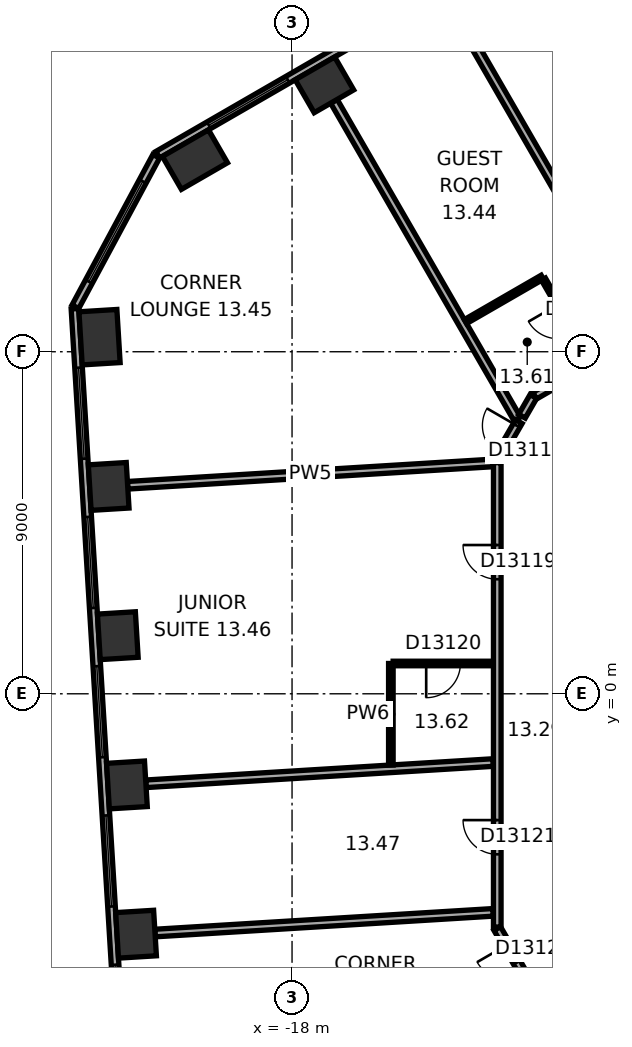
"""IFC4 building model, lengths in metres.
Left out: names, types, materials, properties, quantities, classifications, styles, units other than length and angle.
Written with IfcOpenShell. Run it as: python <this file> out.ifc"""

import sys

from ifc_helpers import new_model, si_unit, direction, frame, frame_2d, origin, origin_2d, place, context, subcontext, project, spatial, rectangle, extrude, element, fill, save


model = new_model("IFC4")
c1 = context("Model", 3, precision=1e-05, world=origin(), true_north=direction((0.0, 1.0)))
c2 = subcontext(c1, "Body", "Model", "MODEL_VIEW")
j1 = project(units=[si_unit("LENGTHUNIT", "METRE"), si_unit("PLANEANGLEUNIT", "RADIAN")], contexts=[c1])
p1 = place(None, origin())
s1 = spatial("IfcSite", under=j1, at=p1, CompositionType="ELEMENT")
p2 = place(p1, origin())
s2 = spatial("IfcBuilding", under=s1, at=p2, CompositionType="ELEMENT")
p3 = place(p2, frame((0.0, 0.0, 63.8)))
s3 = spatial("IfcBuildingStorey", under=s2, at=p3, CompositionType="ELEMENT", Elevation=63.8)
p4 = place(p3, frame((-17.148, 16.023, 0.0), z_axis=(0.0, 0.0, 1.0), x_axis=(-0.866025403784, -0.5, 0.0)))
e1 = element("IfcColumn", 1, at=p4, inside=s3, PredefinedType="COLUMN", context=c2, shape_type="SweptSolid", body=[
    extrude(rectangle(XDim=1.2, YDim=1.0, at=origin_2d()), origin(), (0.0, 0.0, 1.0), 3.3),
])
for number, where, z_axis, x_axis in (
    (2, (-20.555, 14.055, 0.0), (0.0, 0.0, 1.0), (-0.866, -0.5, 0.0)),
    (3, (-23.066, 9.383, 0.0), (0.0, 0.0, 1.0), (0.061, -0.998, 0.0)),
):
    element("IfcColumn", number, at=place(p3, frame(where, z_axis=z_axis, x_axis=x_axis)), inside=s3, PredefinedType="COLUMN", context=c2, shape_type="SweptSolid", body=[
        extrude(rectangle(XDim=1.4, YDim=1.0, at=origin_2d()), origin(), (0.0, 0.0, 1.0), 3.3),
    ])
for number, where, z_axis, x_axis in (
    (4, (-22.826, 5.456, 0.0), (0.0, 0.0, 1.0), (0.061, -0.998, 0.0)),
    (5, (-22.585, 1.529, 0.0), (0.0, 0.0, 1.0), (0.061, -0.998, 0.0)),
    (6, (-22.345, -2.399, 0.0), (0.0, 0.0, 1.0), (0.061, -0.998, 0.0)),
    (7, (-22.105, -6.326, 0.0), (0.0, 0.0, 1.0), (0.061, -0.998, 0.0)),
):
    element("IfcColumn", number, at=place(p3, frame(where, z_axis=z_axis, x_axis=x_axis)), inside=s3, PredefinedType="COLUMN", context=c2, shape_type="SweptSolid", body=[
        extrude(rectangle(XDim=1.2, YDim=1.0, at=origin_2d()), origin(), (0.0, 0.0, 1.0), 3.3),
    ])
p5 = place(p3, frame((-3.136, 24.805, 0.0), z_axis=(0.0, 0.0, 1.0), x_axis=(-0.866028291626, -0.499994998079, 0.0)))
e8 = element("IfcWall", 8, at=p5, inside=s3, PredefinedType="STANDARD", context=c2, shape_type="SweptSolid", body=[
    extrude(rectangle(XDim=21.246, YDim=0.2, at=frame_2d((10.623, 0.0))), origin(), (0.0, 0.0, 1.0), 3.3),
])
p6 = place(p5, frame((1.555, 0.0, 0.8)))
e9 = element("IfcOpeningElement", 9, at=p6, cuts=e8, PredefinedType="OPENING", context=c2, shape_type="SweptSolid", body=[
    extrude(rectangle(XDim=2.4, YDim=1.7, at=frame_2d((1.2, 0.85))), frame((0.0, 0.11, 0.0), z_axis=(0.0, -1.0, 0.0), x_axis=(1.0, 0.0, 0.0)), (0.0, 0.0, 1.0), 0.22),
])
p7 = place(p5, frame((5.489, 0.0, 0.8)))
e10 = element("IfcOpeningElement", 10, at=p7, cuts=e8, PredefinedType="OPENING", context=c2, shape_type="SweptSolid", body=[
    extrude(rectangle(XDim=2.4, YDim=1.7, at=frame_2d((1.2, 0.85))), frame((0.0, 0.11, 0.0), z_axis=(0.0, -1.0, 0.0), x_axis=(1.0, 0.0, 0.0)), (0.0, 0.0, 1.0), 0.22),
])
p8 = place(p5, frame((9.424, 0.0, 0.8)))
e11 = element("IfcOpeningElement", 11, at=p8, cuts=e8, PredefinedType="OPENING", context=c2, shape_type="SweptSolid", body=[
    extrude(rectangle(XDim=2.4, YDim=1.7, at=frame_2d((1.2, 0.85))), frame((0.0, 0.11, 0.0), z_axis=(0.0, -1.0, 0.0), x_axis=(1.0, 0.0, 0.0)), (0.0, 0.0, 1.0), 0.22),
])
p9 = place(p5, frame((13.358, 0.0, 0.8)))
e12 = element("IfcOpeningElement", 12, at=p9, cuts=e8, PredefinedType="OPENING", context=c2, shape_type="SweptSolid", body=[
    extrude(rectangle(XDim=2.4, YDim=1.7, at=frame_2d((1.2, 0.85))), frame((0.0, 0.11, 0.0), z_axis=(0.0, -1.0, 0.0), x_axis=(1.0, 0.0, 0.0)), (0.0, 0.0, 1.0), 0.22),
])
p10 = place(p5, frame((17.293, 0.0, 0.8)))
e13 = element("IfcOpeningElement", 13, at=p10, cuts=e8, PredefinedType="OPENING", context=c2, shape_type="SweptSolid", body=[
    extrude(rectangle(XDim=2.4, YDim=1.7, at=frame_2d((1.2, 0.85))), frame((0.0, 0.11, 0.0), z_axis=(0.0, -1.0, 0.0), x_axis=(1.0, 0.0, 0.0)), (0.0, 0.0, 1.0), 0.22),
])
p11 = place(p3, frame((-21.574, 14.143, 0.0), z_axis=(0.0, 0.0, 1.0), x_axis=(-0.473292949472, -0.880905093628, 0.0)))
e14 = element("IfcWall", 14, at=p11, inside=s3, PredefinedType="STANDARD", context=c2, shape_type="SweptSolid", body=[
    extrude(rectangle(XDim=4.494, YDim=0.2, at=frame_2d((2.247, 0.0))), origin(), (0.0, 0.0, 1.0), 3.3),
])
p12 = place(p11, frame((0.747, 0.0, 0.8)))
e15 = element("IfcOpeningElement", 15, at=p12, cuts=e14, PredefinedType="OPENING", context=c2, shape_type="SweptSolid", body=[
    extrude(rectangle(XDim=3.0, YDim=1.7, at=frame_2d((1.5, 0.85))), frame((0.0, 0.11, 0.0), z_axis=(0.0, -1.0, 0.0), x_axis=(1.0, 0.0, 0.0)), (0.0, 0.0, 1.0), 0.22),
])
p13 = place(p3, frame((-23.713, 10.131, 0.0), z_axis=(0.0, 0.0, 1.0), x_axis=(0.061040439785, -0.998135293791, 0.0)))
e16 = element("IfcWall", 16, at=p13, inside=s3, PredefinedType="STANDARD", context=c2, shape_type="SweptSolid", body=[
    extrude(rectangle(XDim=21.246, YDim=0.2, at=frame_2d((10.623, 0.0))), origin(), (0.0, 0.0, 1.0), 3.3),
])
p14 = place(p13, frame((1.553, 0.0, 0.8)))
e17 = element("IfcOpeningElement", 17, at=p14, cuts=e16, PredefinedType="OPENING", context=c2, shape_type="SweptSolid", body=[
    extrude(rectangle(XDim=2.4, YDim=1.7, at=frame_2d((1.2, 0.85))), frame((0.0, 0.11, 0.0), z_axis=(0.0, -1.0, 0.0), x_axis=(1.0, 0.0, 0.0)), (0.0, 0.0, 1.0), 0.22),
])
p15 = place(p13, frame((5.488, 0.0, 0.8)))
e18 = element("IfcOpeningElement", 18, at=p15, cuts=e16, PredefinedType="OPENING", context=c2, shape_type="SweptSolid", body=[
    extrude(rectangle(XDim=2.4, YDim=1.7, at=frame_2d((1.2, 0.85))), frame((0.0, 0.11, 0.0), z_axis=(0.0, -1.0, 0.0), x_axis=(1.0, 0.0, 0.0)), (0.0, 0.0, 1.0), 0.22),
])
p16 = place(p13, frame((9.422, 0.0, 0.8)))
e19 = element("IfcOpeningElement", 19, at=p16, cuts=e16, PredefinedType="OPENING", context=c2, shape_type="SweptSolid", body=[
    extrude(rectangle(XDim=2.4, YDim=1.7, at=frame_2d((1.2, 0.85))), frame((0.0, 0.11, 0.0), z_axis=(0.0, -1.0, 0.0), x_axis=(1.0, 0.0, 0.0)), (0.0, 0.0, 1.0), 0.22),
])
p17 = place(p13, frame((13.357, 0.0, 0.8)))
e20 = element("IfcOpeningElement", 20, at=p17, cuts=e16, PredefinedType="OPENING", context=c2, shape_type="SweptSolid", body=[
    extrude(rectangle(XDim=2.4, YDim=1.7, at=frame_2d((1.2, 0.85))), frame((0.0, 0.11, 0.0), z_axis=(0.0, -1.0, 0.0), x_axis=(1.0, 0.0, 0.0)), (0.0, 0.0, 1.0), 0.22),
])
p18 = place(p13, frame((17.292, 0.0, 0.8)))
e21 = element("IfcOpeningElement", 21, at=p18, cuts=e16, PredefinedType="OPENING", context=c2, shape_type="SweptSolid", body=[
    extrude(rectangle(XDim=2.4, YDim=1.7, at=frame_2d((1.2, 0.85))), frame((0.0, 0.11, 0.0), z_axis=(0.0, -1.0, 0.0), x_axis=(1.0, 0.0, 0.0)), (0.0, 0.0, 1.0), 0.22),
])
p19 = place(p3, frame((-22.327, 5.486, 0.0), z_axis=(0.0, 0.0, 1.0), x_axis=(0.998135194863, 0.061042057435, 0.0)))
e22 = element("IfcWall", 22, at=p19, inside=s3, PredefinedType="PARTITIONING", context=c2, shape_type="SweptSolid", body=[
    extrude(rectangle(XDim=9.635, YDim=0.2, at=frame_2d((4.817, 0.0))), origin(), (0.0, 0.0, 1.0), 3.05),
])
p20 = place(p3, frame((-21.846, -2.368, 0.0), z_axis=(0.0, 0.0, 1.0), x_axis=(0.998134617584, 0.061051496129, 0.0)))
e23 = element("IfcWall", 23, at=p20, inside=s3, PredefinedType="PARTITIONING", context=c2, shape_type="SweptSolid", body=[
    extrude(rectangle(XDim=9.154, YDim=0.2, at=frame_2d((4.577, 0.0))), origin(), (0.0, 0.0, 1.0), 3.05),
])
p21 = place(p3, frame((-21.606, -6.295, 0.0), z_axis=(0.0, 0.0, 1.0), x_axis=(0.998134305525, 0.061056597794, 0.0)))
e24 = element("IfcWall", 24, at=p21, inside=s3, PredefinedType="PARTITIONING", context=c2, shape_type="SweptSolid", body=[
    extrude(rectangle(XDim=8.913, YDim=0.2, at=frame_2d((4.457, 0.0))), origin(), (0.0, 0.0, 1.0), 2.6),
])
p22 = place(p3, frame((-16.898, 15.59, 0.0), z_axis=(0.0, 0.0, 1.0), x_axis=(0.499994742786, -0.866028439017, 0.0)))
e25 = element("IfcWall", 25, at=p22, inside=s3, PredefinedType="PARTITIONING", context=c2, shape_type="SweptSolid", body=[
    extrude(rectangle(XDim=9.65, YDim=0.2, at=frame_2d((4.825, 0.0))), origin(), (0.0, 0.0, 1.0), 3.05),
])
p23 = place(p3, frame((-15.4, -1.874, 0.0), z_axis=(0.0, 0.0, 1.0), x_axis=(0.0, 1.0, 0.0)))
e26 = element("IfcWall", 26, at=p23, inside=s3, PredefinedType="PARTITIONING", context=c2, shape_type="SweptSolid", body=[
    extrude(rectangle(XDim=2.671, YDim=0.12, at=frame_2d((1.335, 0.0))), origin(), (0.0, 0.0, 1.0), 3.05),
])
p24 = place(p3, frame((-15.34, 0.797, 0.0), z_axis=(0.0, 0.0, 1.0), x_axis=(1.0, 0.0, 0.0)))
e27 = element("IfcWall", 27, at=p24, inside=s3, PredefinedType="PARTITIONING", context=c2, shape_type="SweptSolid", body=[
    extrude(rectangle(XDim=2.64, YDim=0.12, at=frame_2d((1.32, 0.0))), origin(), (0.0, 0.0, 1.0), 2.6),
])
p25 = place(p24, frame((0.87, 0.0, 0.0)))
e28 = element("IfcOpeningElement", 28, at=p25, cuts=e27, PredefinedType="OPENING", context=c2, shape_type="SweptSolid", body=[
    extrude(rectangle(XDim=0.9, YDim=2.1, at=frame_2d((0.45, 1.05))), frame((0.0, 0.07, 0.0), z_axis=(0.0, -1.0, 0.0), x_axis=(1.0, 0.0, 0.0)), (0.0, 0.0, 1.0), 0.14),
])
p26 = place(p3, frame((-13.436, 9.794, 0.0), z_axis=(0.0, 0.0, 1.0), x_axis=(0.866053246676, 0.499951771596, 0.0)))
e29 = element("IfcWall", 29, at=p26, inside=s3, PredefinedType="PARTITIONING", context=c2, shape_type="SweptSolid", body=[
    extrude(rectangle(XDim=2.335, YDim=0.12, at=frame_2d((1.167, 0.0))), origin(), (0.0, 0.0, 1.0), 3.05),
])
p27 = place(p3, frame((-12.6, -6.177, 0.0), z_axis=(0.0, 0.0, 1.0), x_axis=(0.500063520245, -0.865988727248, 0.0)))
e30 = element("IfcWall", 30, at=p27, inside=s3, PredefinedType="PARTITIONING", context=c2, shape_type="SweptSolid", body=[
    extrude(rectangle(XDim=1.9, YDim=0.2, at=frame_2d((0.95, 0.0))), origin(), (0.0, 0.0, 1.0), 3.05),
])
p28 = place(p27, frame((0.5, 0.0, 0.0)))
e31 = element("IfcOpeningElement", 31, at=p28, cuts=e30, PredefinedType="OPENING", context=c2, shape_type="SweptSolid", body=[
    extrude(rectangle(XDim=0.9, YDim=2.1, at=frame_2d((0.45, 1.05))), frame((0.0, 0.11, 0.0), z_axis=(0.0, -1.0, 0.0), x_axis=(1.0, 0.0, 0.0)), (0.0, 0.0, 1.0), 0.22),
])
p29 = place(p3, frame((-12.6, 6.081, 0.0), z_axis=(0.0, 0.0, 1.0), x_axis=(0.0, -1.0, 0.0)))
e32 = element("IfcWall", 32, at=p29, inside=s3, PredefinedType="PARTITIONING", context=c2, shape_type="SweptSolid", body=[
    extrude(rectangle(XDim=12.219, YDim=0.2, at=frame_2d((6.109, 0.0))), origin(), (0.0, 0.0, 1.0), 3.05),
])
p30 = place(p29, frame((2.167, 0.0, 0.0)))
e33 = element("IfcOpeningElement", 33, at=p30, cuts=e32, PredefinedType="OPENING", context=c2, shape_type="SweptSolid", body=[
    extrude(rectangle(XDim=0.9, YDim=2.1, at=frame_2d((0.45, 1.05))), frame((0.0, 0.11, 0.0), z_axis=(0.0, -1.0, 0.0), x_axis=(1.0, 0.0, 0.0)), (0.0, 0.0, 1.0), 0.22),
])
p31 = place(p29, frame((9.405, 0.0, 0.0)))
e34 = element("IfcOpeningElement", 34, at=p31, cuts=e32, PredefinedType="OPENING", context=c2, shape_type="SweptSolid", body=[
    extrude(rectangle(XDim=0.9, YDim=2.1, at=frame_2d((0.45, 1.05))), frame((0.0, 0.11, 0.0), z_axis=(0.0, -1.0, 0.0), x_axis=(1.0, 0.0, 0.0)), (0.0, 0.0, 1.0), 0.22),
])
p32 = place(p3, frame((-12.032, 7.162, 0.0), z_axis=(0.0, 0.0, 1.0), x_axis=(-0.499951829968, -0.866053212979, 0.0)))
e35 = element("IfcWall", 35, at=p32, inside=s3, PredefinedType="PARTITIONING", context=c2, shape_type="SweptSolid", body=[
    extrude(rectangle(XDim=1.136, YDim=0.2, at=frame_2d((0.568, 0.0))), origin(), (0.0, 0.0, 1.0), 3.05),
])
p33 = place(p32, frame((0.118, 0.0, 0.0)))
e36 = element("IfcOpeningElement", 36, at=p33, cuts=e35, PredefinedType="OPENING", context=c2, shape_type="SweptSolid", body=[
    extrude(rectangle(XDim=0.9, YDim=2.1, at=frame_2d((0.45, 1.05))), frame((0.0, 0.11, 0.0), z_axis=(0.0, -1.0, 0.0), x_axis=(1.0, 0.0, 0.0)), (0.0, 0.0, 1.0), 0.22),
])
p34 = place(p3, frame((-11.65, 7.823, 0.0), z_axis=(0.0, 0.0, 1.0), x_axis=(-0.50012165622, -0.865955154139, 0.0)))
e37 = element("IfcWall", 37, at=p34, inside=s3, PredefinedType="PARTITIONING", context=c2, shape_type="SweptSolid", body=[
    extrude(rectangle(XDim=0.6, YDim=0.2, at=frame_2d((0.3, 0.0))), origin(), (0.0, 0.0, 1.0), 3.05),
])
p35 = place(p3, frame((-11.385, 10.909, 0.0), z_axis=(0.0, 0.0, 1.0), x_axis=(0.500077547548, -0.865980627057, 0.0)))
e38 = element("IfcWall", 38, at=p35, inside=s3, PredefinedType="PARTITIONING", context=c2, shape_type="SweptSolid", body=[
    extrude(rectangle(XDim=2.44, YDim=0.12, at=frame_2d((1.22, 0.0))), origin(), (0.0, 0.0, 1.0), 3.05),
])
p36 = place(p35, frame((0.77, 0.0, 0.0)))
e39 = element("IfcOpeningElement", 39, at=p36, cuts=e38, PredefinedType="OPENING", context=c2, shape_type="SweptSolid", body=[
    extrude(rectangle(XDim=0.9, YDim=2.1, at=frame_2d((0.45, 1.05))), frame((0.0, 0.07, 0.0), z_axis=(0.0, -1.0, 0.0), x_axis=(1.0, 0.0, 0.0)), (0.0, 0.0, 1.0), 0.14),
])
p37 = place(p3, frame((-8.902, 9.41, 0.0), z_axis=(0.0, 0.0, 1.0), x_axis=(-0.866014299198, -0.500019233215, 0.0)))
e40 = element("IfcWall", 40, at=p37, inside=s3, PredefinedType="PARTITIONING", context=c2, shape_type="SweptSolid", body=[
    extrude(rectangle(XDim=3.133, YDim=0.2, at=frame_2d((1.567, 0.0))), origin(), (0.0, 0.0, 1.0), 3.05),
])
p38 = place(p37, frame((0.225, 0.0, 0.0)))
e41 = element("IfcOpeningElement", 41, at=p38, cuts=e40, PredefinedType="OPENING", context=c2, shape_type="SweptSolid", body=[
    extrude(rectangle(XDim=0.9, YDim=2.1, at=frame_2d((0.45, 1.05))), frame((0.0, 0.11, 0.0), z_axis=(0.0, -1.0, 0.0), x_axis=(1.0, 0.0, 0.0)), (0.0, 0.0, 1.0), 0.22),
])
p39 = place(p3, frame((-7.865, 7.814, 0.0), z_axis=(0.0, 0.0, 1.0), x_axis=(-0.500004234368, 0.866022959057, 0.0)))
e42 = element("IfcWall", 42, at=p39, inside=s3, PredefinedType="PARTITIONING", context=c2, shape_type="SweptSolid", body=[
    extrude(rectangle(XDim=11.25, YDim=0.2, at=frame_2d((5.625, 0.0))), origin(), (0.0, 0.0, 1.0), 3.05),
])
p40 = place(p39, frame((0.5, 0.0, 0.0)))
e43 = element("IfcOpeningElement", 43, at=p40, cuts=e42, PredefinedType="OPENING", context=c2, shape_type="SweptSolid", body=[
    extrude(rectangle(XDim=0.9, YDim=2.1, at=frame_2d((0.45, 1.05))), frame((0.0, 0.11, 0.0), z_axis=(0.0, -1.0, 0.0), x_axis=(1.0, 0.0, 0.0)), (0.0, 0.0, 1.0), 0.22),
])
p41 = place(p10, origin())
e44 = element("IfcWindow", 44, at=p41, inside=s3, PartitioningType="SINGLE_PANEL", PredefinedType="WINDOW", context=c2, shape_type="SweptSolid", body=[
    extrude(rectangle(XDim=2.4, YDim=1.7, at=frame_2d((1.2, 0.85))), frame((0.0, 0.03, 0.0), z_axis=(0.0, -1.0, 0.0), x_axis=(1.0, 0.0, 0.0)), (0.0, 0.0, 1.0), 0.06),
])
fill(e13, e44)
p42 = place(p12, origin())
e45 = element("IfcWindow", 45, at=p42, inside=s3, PartitioningType="SINGLE_PANEL", PredefinedType="WINDOW", context=c2, shape_type="SweptSolid", body=[
    extrude(rectangle(XDim=3.0, YDim=1.7, at=frame_2d((1.5, 0.85))), frame((0.0, 0.03, 0.0), z_axis=(0.0, -1.0, 0.0), x_axis=(1.0, 0.0, 0.0)), (0.0, 0.0, 1.0), 0.06),
])
fill(e15, e45)
p43 = place(p14, origin())
e46 = element("IfcWindow", 46, at=p43, inside=s3, PartitioningType="SINGLE_PANEL", PredefinedType="WINDOW", context=c2, shape_type="SweptSolid", body=[
    extrude(rectangle(XDim=2.4, YDim=1.7, at=frame_2d((1.2, 0.85))), frame((0.0, 0.03, 0.0), z_axis=(0.0, -1.0, 0.0), x_axis=(1.0, 0.0, 0.0)), (0.0, 0.0, 1.0), 0.06),
])
fill(e17, e46)
p44 = place(p15, origin())
e47 = element("IfcWindow", 47, at=p44, inside=s3, PartitioningType="SINGLE_PANEL", PredefinedType="WINDOW", context=c2, shape_type="SweptSolid", body=[
    extrude(rectangle(XDim=2.4, YDim=1.7, at=frame_2d((1.2, 0.85))), frame((0.0, 0.03, 0.0), z_axis=(0.0, -1.0, 0.0), x_axis=(1.0, 0.0, 0.0)), (0.0, 0.0, 1.0), 0.06),
])
fill(e18, e47)
p45 = place(p16, origin())
e48 = element("IfcWindow", 48, at=p45, inside=s3, PartitioningType="SINGLE_PANEL", PredefinedType="WINDOW", context=c2, shape_type="SweptSolid", body=[
    extrude(rectangle(XDim=2.4, YDim=1.7, at=frame_2d((1.2, 0.85))), frame((0.0, 0.03, 0.0), z_axis=(0.0, -1.0, 0.0), x_axis=(1.0, 0.0, 0.0)), (0.0, 0.0, 1.0), 0.06),
])
fill(e19, e48)
p46 = place(p17, origin())
e49 = element("IfcWindow", 49, at=p46, inside=s3, PartitioningType="SINGLE_PANEL", PredefinedType="WINDOW", context=c2, shape_type="SweptSolid", body=[
    extrude(rectangle(XDim=2.4, YDim=1.7, at=frame_2d((1.2, 0.85))), frame((0.0, 0.03, 0.0), z_axis=(0.0, -1.0, 0.0), x_axis=(1.0, 0.0, 0.0)), (0.0, 0.0, 1.0), 0.06),
])
fill(e20, e49)
p47 = place(p18, origin())
e50 = element("IfcWindow", 50, at=p47, inside=s3, PartitioningType="SINGLE_PANEL", PredefinedType="WINDOW", context=c2, shape_type="SweptSolid", body=[
    extrude(rectangle(XDim=2.4, YDim=1.7, at=frame_2d((1.2, 0.85))), frame((0.0, 0.03, 0.0), z_axis=(0.0, -1.0, 0.0), x_axis=(1.0, 0.0, 0.0)), (0.0, 0.0, 1.0), 0.06),
])
fill(e21, e50)
p48 = place(p33, origin())
e51 = element("IfcDoor", 51, at=p48, inside=s3, OperationType="SINGLE_SWING_LEFT", PredefinedType="DOOR", context=c2, shape_type="SweptSolid", body=[
    extrude(rectangle(XDim=0.9, YDim=2.1, at=frame_2d((0.45, 1.05))), frame((0.0, 0.025, 0.0), z_axis=(0.0, -1.0, 0.0), x_axis=(1.0, 0.0, 0.0)), (0.0, 0.0, 1.0), 0.05),
])
fill(e36, e51)
p49 = place(p30, origin())
e52 = element("IfcDoor", 52, at=p49, inside=s3, OperationType="SINGLE_SWING_LEFT", PredefinedType="DOOR", context=c2, shape_type="SweptSolid", body=[
    extrude(rectangle(XDim=0.9, YDim=2.1, at=frame_2d((0.45, 1.05))), frame((0.0, 0.025, 0.0), z_axis=(0.0, -1.0, 0.0), x_axis=(1.0, 0.0, 0.0)), (0.0, 0.0, 1.0), 0.05),
])
fill(e33, e52)
p50 = place(p25, origin())
e53 = element("IfcDoor", 53, at=p50, inside=s3, OperationType="SINGLE_SWING_LEFT", PredefinedType="DOOR", context=c2, shape_type="SweptSolid", body=[
    extrude(rectangle(XDim=0.9, YDim=2.1, at=frame_2d((0.45, 1.05))), frame((0.0, 0.025, 0.0), z_axis=(0.0, -1.0, 0.0), x_axis=(1.0, 0.0, 0.0)), (0.0, 0.0, 1.0), 0.05),
])
fill(e28, e53)
p51 = place(p31, origin())
e54 = element("IfcDoor", 54, at=p51, inside=s3, OperationType="SINGLE_SWING_LEFT", PredefinedType="DOOR", context=c2, shape_type="SweptSolid", body=[
    extrude(rectangle(XDim=0.9, YDim=2.1, at=frame_2d((0.45, 1.05))), frame((0.0, 0.025, 0.0), z_axis=(0.0, -1.0, 0.0), x_axis=(1.0, 0.0, 0.0)), (0.0, 0.0, 1.0), 0.05),
])
fill(e34, e54)
p52 = place(p28, origin())
e55 = element("IfcDoor", 55, at=p52, inside=s3, OperationType="SINGLE_SWING_LEFT", PredefinedType="DOOR", context=c2, shape_type="SweptSolid", body=[
    extrude(rectangle(XDim=0.9, YDim=2.1, at=frame_2d((0.45, 1.05))), frame((0.0, 0.025, 0.0), z_axis=(0.0, -1.0, 0.0), x_axis=(1.0, 0.0, 0.0)), (0.0, 0.0, 1.0), 0.05),
])
fill(e31, e55)
save(model, sys.argv[1])
